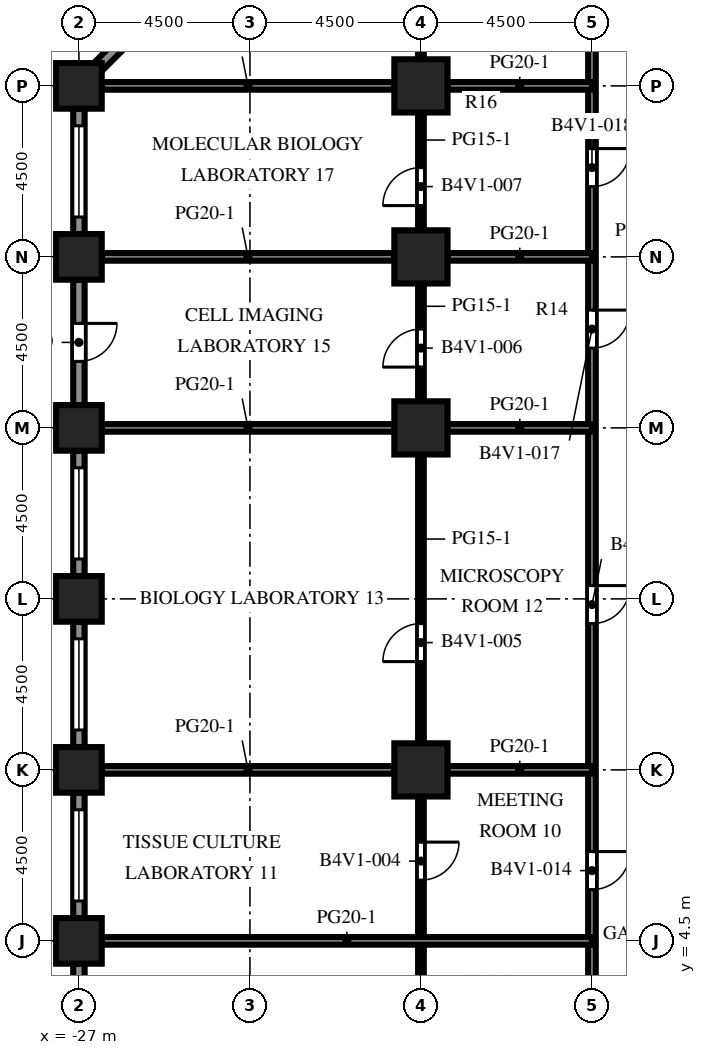
"""IFC4 building model, lengths in metres.
Left out: names, types, materials, properties, quantities, classifications, styles, units other than length and angle.
Written with IfcOpenShell. Run it as: python <this file> out.ifc"""

import sys

from ifc_helpers import new_model, si_unit, direction, frame, frame_2d, origin, origin_2d, place, context, subcontext, project, spatial, rectangle, extrude, element, fill, save


model = new_model("IFC4")
c1 = context("Model", 3, precision=1e-05, world=origin(), true_north=direction((0.0, 1.0)))
c2 = subcontext(c1, "Body", "Model", "MODEL_VIEW")
j1 = project(units=[si_unit("LENGTHUNIT", "METRE"), si_unit("PLANEANGLEUNIT", "RADIAN")], contexts=[c1])
p1 = place(None, origin())
s1 = spatial("IfcSite", under=j1, at=p1, CompositionType="ELEMENT")
p2 = place(p1, origin())
s2 = spatial("IfcBuilding", under=s1, at=p2, CompositionType="ELEMENT")
p3 = place(p2, frame((0.0, 0.0, 133.1)))
s3 = spatial("IfcBuildingStorey", under=s2, at=p3, CompositionType="ELEMENT", Elevation=133.1)
for number, where, z_axis, x_axis in (
    (1, (-27.0, 4.5, 0.0), (0.0, 0.0, 1.0), (1.0, 0.0, 0.0)),
    (2, (-27.0, 9.0, 0.0), (0.0, 0.0, 1.0), (1.0, 0.0, 0.0)),
    (3, (-27.0, 13.5, 0.0), (0.0, 0.0, 1.0), (1.0, 0.0, 0.0)),
    (4, (-27.0, 18.0, 0.0), (0.0, 0.0, 1.0), (1.0, 0.0, 0.0)),
    (5, (-27.0, 22.5, 0.0), (0.0, 0.0, 1.0), (1.0, 0.0, 0.0)),
    (6, (-27.0, 27.0, 0.0), (0.0, 0.0, 1.0), (1.0, 0.0, 0.0)),
):
    element("IfcColumn", number, at=place(p3, frame(where, z_axis=z_axis, x_axis=x_axis)), inside=s3, PredefinedType="COLUMN", context=c2, shape_type="SweptSolid", body=[
        extrude(rectangle(XDim=1.2, YDim=1.2, at=origin_2d()), origin(), (0.0, 0.0, 1.0), 4.1),
    ])
for number, where, z_axis, x_axis in (
    (7, (-18.0, 9.0, 0.0), (0.0, 0.0, 1.0), (1.0, 0.0, 0.0)),
    (8, (-18.0, 18.0, 0.0), (0.0, 0.0, 1.0), (1.0, 0.0, 0.0)),
    (9, (-18.0, 22.5, 0.0), (0.0, 0.0, 1.0), (1.0, 0.0, 0.0)),
    (10, (-18.0, 27.0, 0.0), (0.0, 0.0, 1.0), (1.0, 0.0, 0.0)),
):
    element("IfcColumn", number, at=place(p3, frame(where, z_axis=z_axis, x_axis=x_axis)), inside=s3, PredefinedType="COLUMN", context=c2, shape_type="SweptSolid", body=[
        extrude(rectangle(XDim=1.4, YDim=1.4, at=origin_2d()), origin(), (0.0, 0.0, 1.0), 4.1),
    ])
p4 = place(p3, frame((-26.506, 27.494, 0.0), z_axis=(0.0, 0.0, 1.0), x_axis=(0.707106781187, 0.707106781187, 0.0)))
e11 = element("IfcWall", 11, at=p4, inside=s3, PredefinedType="SOLIDWALL", context=c2, shape_type="SweptSolid", body=[
    extrude(rectangle(XDim=4.967, YDim=0.3, at=frame_2d((2.483, 0.0))), origin(), (0.0, 0.0, 1.0), 2.75),
])
p5 = place(p4, frame((1.884, 0.0, 0.0)))
e12 = element("IfcOpeningElement", 12, at=p5, cuts=e11, PredefinedType="OPENING", context=c2, shape_type="SweptSolid", body=[
    extrude(rectangle(XDim=1.2, YDim=2.2, at=frame_2d((0.6, 1.1))), frame((0.0, 0.16, 0.0), z_axis=(0.0, -1.0, 0.0), x_axis=(1.0, 0.0, 0.0)), (0.0, 0.0, 1.0), 0.32),
])
p6 = place(p3, frame((-27.0, 23.1, 0.0), z_axis=(0.0, 0.0, 1.0), x_axis=(0.0, 1.0, 0.0)))
e13 = element("IfcWall", 13, at=p6, inside=s3, PredefinedType="SOLIDWALL", context=c2, shape_type="SweptSolid", body=[
    extrude(rectangle(XDim=3.3, YDim=0.3, at=frame_2d((1.65, 0.0))), origin(), (0.0, 0.0, 1.0), 2.75),
])
p7 = place(p6, frame((0.45, 0.0, 0.8)))
e14 = element("IfcOpeningElement", 14, at=p7, cuts=e13, PredefinedType="OPENING", context=c2, shape_type="SweptSolid", body=[
    extrude(rectangle(XDim=2.4, YDim=1.7, at=frame_2d((1.2, 0.85))), frame((0.0, 0.16, 0.0), z_axis=(0.0, -1.0, 0.0), x_axis=(1.0, 0.0, 0.0)), (0.0, 0.0, 1.0), 0.32),
])
p8 = place(p3, frame((-27.0, 18.6, 0.0), z_axis=(0.0, 0.0, 1.0), x_axis=(0.0, 1.0, 0.0)))
e15 = element("IfcWall", 15, at=p8, inside=s3, PredefinedType="SOLIDWALL", context=c2, shape_type="SweptSolid", body=[
    extrude(rectangle(XDim=3.3, YDim=0.3, at=frame_2d((1.65, 0.0))), origin(), (0.0, 0.0, 1.0), 2.75),
])
p9 = place(p8, frame((1.15, 0.0, 0.0)))
e16 = element("IfcOpeningElement", 16, at=p9, cuts=e15, PredefinedType="OPENING", context=c2, shape_type="SweptSolid", body=[
    extrude(rectangle(XDim=1.0, YDim=2.2, at=frame_2d((0.5, 1.1))), frame((0.0, 0.16, 0.0), z_axis=(0.0, -1.0, 0.0), x_axis=(1.0, 0.0, 0.0)), (0.0, 0.0, 1.0), 0.32),
])
p10 = place(p3, frame((-27.0, 14.1, 0.0), z_axis=(0.0, 0.0, 1.0), x_axis=(0.0, 1.0, 0.0)))
e17 = element("IfcWall", 17, at=p10, inside=s3, PredefinedType="SOLIDWALL", context=c2, shape_type="SweptSolid", body=[
    extrude(rectangle(XDim=3.3, YDim=0.3, at=frame_2d((1.65, 0.0))), origin(), (0.0, 0.0, 1.0), 2.75),
])
p11 = place(p10, frame((0.45, 0.0, 0.8)))
e18 = element("IfcOpeningElement", 18, at=p11, cuts=e17, PredefinedType="OPENING", context=c2, shape_type="SweptSolid", body=[
    extrude(rectangle(XDim=2.4, YDim=1.7, at=frame_2d((1.2, 0.85))), frame((0.0, 0.16, 0.0), z_axis=(0.0, -1.0, 0.0), x_axis=(1.0, 0.0, 0.0)), (0.0, 0.0, 1.0), 0.32),
])
p12 = place(p3, frame((-27.0, 9.6, 0.0), z_axis=(0.0, 0.0, 1.0), x_axis=(0.0, 1.0, 0.0)))
e19 = element("IfcWall", 19, at=p12, inside=s3, PredefinedType="SOLIDWALL", context=c2, shape_type="SweptSolid", body=[
    extrude(rectangle(XDim=3.3, YDim=0.3, at=frame_2d((1.65, 0.0))), origin(), (0.0, 0.0, 1.0), 2.75),
])
p13 = place(p12, frame((0.45, 0.0, 0.8)))
e20 = element("IfcOpeningElement", 20, at=p13, cuts=e19, PredefinedType="OPENING", context=c2, shape_type="SweptSolid", body=[
    extrude(rectangle(XDim=2.4, YDim=1.7, at=frame_2d((1.2, 0.85))), frame((0.0, 0.16, 0.0), z_axis=(0.0, -1.0, 0.0), x_axis=(1.0, 0.0, 0.0)), (0.0, 0.0, 1.0), 0.32),
])
p14 = place(p3, frame((-27.0, 5.1, 0.0), z_axis=(0.0, 0.0, 1.0), x_axis=(0.0, 1.0, 0.0)))
e21 = element("IfcWall", 21, at=p14, inside=s3, PredefinedType="SOLIDWALL", context=c2, shape_type="SweptSolid", body=[
    extrude(rectangle(XDim=3.3, YDim=0.3, at=frame_2d((1.65, 0.0))), origin(), (0.0, 0.0, 1.0), 2.75),
])
p15 = place(p14, frame((0.45, 0.0, 0.8)))
e22 = element("IfcOpeningElement", 22, at=p15, cuts=e21, PredefinedType="OPENING", context=c2, shape_type="SweptSolid", body=[
    extrude(rectangle(XDim=2.4, YDim=1.7, at=frame_2d((1.2, 0.85))), frame((0.0, 0.16, 0.0), z_axis=(0.0, -1.0, 0.0), x_axis=(1.0, 0.0, 0.0)), (0.0, 0.0, 1.0), 0.32),
])
p16 = place(p3, frame((-27.0, 0.6, 0.0), z_axis=(0.0, 0.0, 1.0), x_axis=(0.0, 1.0, 0.0)))
e23 = element("IfcWall", 23, at=p16, inside=s3, PredefinedType="SOLIDWALL", context=c2, shape_type="SweptSolid", body=[
    extrude(rectangle(XDim=3.3, YDim=0.3, at=frame_2d((1.65, 0.0))), origin(), (0.0, 0.0, 1.0), 2.75),
])
p17 = place(p16, frame((0.45, 0.0, 0.8)))
e24 = element("IfcOpeningElement", 24, at=p17, cuts=e23, PredefinedType="OPENING", context=c2, shape_type="SweptSolid", body=[
    extrude(rectangle(XDim=2.4, YDim=1.7, at=frame_2d((1.2, 0.85))), frame((0.0, 0.16, 0.0), z_axis=(0.0, -1.0, 0.0), x_axis=(1.0, 0.0, 0.0)), (0.0, 0.0, 1.0), 0.32),
])
p18 = place(p3, frame((-18.0, 0.7, 0.0), z_axis=(0.0, 0.0, 1.0), x_axis=(0.0, 1.0, 0.0)))
e25 = element("IfcWall", 25, at=p18, inside=s3, PredefinedType="PARTITIONING", context=c2, shape_type="SweptSolid", body=[
    extrude(rectangle(XDim=7.6, YDim=0.15, at=frame_2d((3.8, 0.0))), origin(), (0.0, 0.0, 1.0), 3.65),
])
p19 = place(p18, frame((5.4, 0.0, 0.0)))
e26 = element("IfcOpeningElement", 26, at=p19, cuts=e25, PredefinedType="OPENING", context=c2, shape_type="SweptSolid", body=[
    extrude(rectangle(XDim=1.0, YDim=2.1, at=frame_2d((0.5, 1.05))), frame((0.0, 0.085, 0.0), z_axis=(0.0, -1.0, 0.0), x_axis=(1.0, 0.0, 0.0)), (0.0, 0.0, 1.0), 0.17),
])
p20 = place(p3, frame((-18.0, 9.7, 0.0), z_axis=(0.0, 0.0, 1.0), x_axis=(0.0, 1.0, 0.0)))
e27 = element("IfcWall", 27, at=p20, inside=s3, PredefinedType="PARTITIONING", context=c2, shape_type="SweptSolid", body=[
    extrude(rectangle(XDim=7.6, YDim=0.15, at=frame_2d((3.8, 0.0))), origin(), (0.0, 0.0, 1.0), 3.65),
])
p21 = place(p20, frame((2.15, 0.0, 0.0)))
e28 = element("IfcOpeningElement", 28, at=p21, cuts=e27, PredefinedType="OPENING", context=c2, shape_type="SweptSolid", body=[
    extrude(rectangle(XDim=1.0, YDim=2.1, at=frame_2d((0.5, 1.05))), frame((0.0, 0.085, 0.0), z_axis=(0.0, -1.0, 0.0), x_axis=(1.0, 0.0, 0.0)), (0.0, 0.0, 1.0), 0.17),
])
p22 = place(p3, frame((-18.0, 18.7, 0.0), z_axis=(0.0, 0.0, 1.0), x_axis=(0.0, 1.0, 0.0)))
e29 = element("IfcWall", 29, at=p22, inside=s3, PredefinedType="PARTITIONING", context=c2, shape_type="SweptSolid", body=[
    extrude(rectangle(XDim=3.1, YDim=0.15, at=frame_2d((1.55, 0.0))), origin(), (0.0, 0.0, 1.0), 3.65),
])
p23 = place(p22, frame((0.9, 0.0, 0.0)))
e30 = element("IfcOpeningElement", 30, at=p23, cuts=e29, PredefinedType="OPENING", context=c2, shape_type="SweptSolid", body=[
    extrude(rectangle(XDim=1.0, YDim=2.1, at=frame_2d((0.5, 1.05))), frame((0.0, 0.085, 0.0), z_axis=(0.0, -1.0, 0.0), x_axis=(1.0, 0.0, 0.0)), (0.0, 0.0, 1.0), 0.17),
])
p24 = place(p3, frame((-18.0, 23.2, 0.0), z_axis=(0.0, 0.0, 1.0), x_axis=(0.0, 1.0, 0.0)))
e31 = element("IfcWall", 31, at=p24, inside=s3, PredefinedType="PARTITIONING", context=c2, shape_type="SweptSolid", body=[
    extrude(rectangle(XDim=3.1, YDim=0.15, at=frame_2d((1.55, 0.0))), origin(), (0.0, 0.0, 1.0), 3.65),
])
p25 = place(p24, frame((0.65, 0.0, 0.0)))
e32 = element("IfcOpeningElement", 32, at=p25, cuts=e31, PredefinedType="OPENING", context=c2, shape_type="SweptSolid", body=[
    extrude(rectangle(XDim=1.0, YDim=2.1, at=frame_2d((0.5, 1.05))), frame((0.0, 0.085, 0.0), z_axis=(0.0, -1.0, 0.0), x_axis=(1.0, 0.0, 0.0)), (0.0, 0.0, 1.0), 0.17),
])
p26 = place(p3, frame((-18.0, 27.7, 0.0), z_axis=(0.0, 0.0, 1.0), x_axis=(0.0, 1.0, 0.0)))
e33 = element("IfcWall", 33, at=p26, inside=s3, PredefinedType="PARTITIONING", context=c2, shape_type="SweptSolid", body=[
    extrude(rectangle(XDim=3.2, YDim=0.15, at=frame_2d((1.6, 0.0))), origin(), (0.0, 0.0, 1.0), 3.65),
])
p27 = place(p26, frame((0.4, 0.0, 0.0)))
e34 = element("IfcOpeningElement", 34, at=p27, cuts=e33, PredefinedType="OPENING", context=c2, shape_type="SweptSolid", body=[
    extrude(rectangle(XDim=1.0, YDim=2.1, at=frame_2d((0.5, 1.05))), frame((0.0, 0.085, 0.0), z_axis=(0.0, -1.0, 0.0), x_axis=(1.0, 0.0, 0.0)), (0.0, 0.0, 1.0), 0.17),
])
p28 = place(p3, frame((-13.5, -21.9, 0.0), z_axis=(0.0, 0.0, 1.0), x_axis=(0.0, 1.0, 0.0)))
e35 = element("IfcWall", 35, at=p28, inside=s3, PredefinedType="PARTITIONING", context=c2, shape_type="SweptSolid", body=[
    extrude(rectangle(XDim=52.8, YDim=0.2, at=frame_2d((26.4, 0.0))), origin(), (0.0, 0.0, 1.0), 3.65),
])
p29 = place(p28, frame((3.25, 0.0, 0.0)))
e36 = element("IfcOpeningElement", 36, at=p29, cuts=e35, PredefinedType="OPENING", context=c2, shape_type="SweptSolid", body=[
    extrude(rectangle(XDim=1.0, YDim=2.1, at=frame_2d((0.5, 1.05))), frame((0.0, 0.11, 0.0), z_axis=(0.0, -1.0, 0.0), x_axis=(1.0, 0.0, 0.0)), (0.0, 0.0, 1.0), 0.22),
])
p30 = place(p28, frame((10.0, 0.0, 0.0)))
e37 = element("IfcOpeningElement", 37, at=p30, cuts=e35, PredefinedType="OPENING", context=c2, shape_type="SweptSolid", body=[
    extrude(rectangle(XDim=1.0, YDim=2.1, at=frame_2d((0.5, 1.05))), frame((0.0, 0.11, 0.0), z_axis=(0.0, -1.0, 0.0), x_axis=(1.0, 0.0, 0.0)), (0.0, 0.0, 1.0), 0.22),
])
p31 = place(p28, frame((21.0, 0.0, 0.0)))
e38 = element("IfcOpeningElement", 38, at=p31, cuts=e35, PredefinedType="OPENING", context=c2, shape_type="SweptSolid", body=[
    extrude(rectangle(XDim=1.0, YDim=2.1, at=frame_2d((0.5, 1.05))), frame((0.0, 0.11, 0.0), z_axis=(0.0, -1.0, 0.0), x_axis=(1.0, 0.0, 0.0)), (0.0, 0.0, 1.0), 0.22),
])
p32 = place(p28, frame((27.75, 0.0, 0.0)))
e39 = element("IfcOpeningElement", 39, at=p32, cuts=e35, PredefinedType="OPENING", context=c2, shape_type="SweptSolid", body=[
    extrude(rectangle(XDim=1.0, YDim=2.1, at=frame_2d((0.5, 1.05))), frame((0.0, 0.11, 0.0), z_axis=(0.0, -1.0, 0.0), x_axis=(1.0, 0.0, 0.0)), (0.0, 0.0, 1.0), 0.22),
])
p33 = place(p28, frame((34.75, 0.0, 0.0)))
e40 = element("IfcOpeningElement", 40, at=p33, cuts=e35, PredefinedType="OPENING", context=c2, shape_type="SweptSolid", body=[
    extrude(rectangle(XDim=1.0, YDim=2.1, at=frame_2d((0.5, 1.05))), frame((0.0, 0.11, 0.0), z_axis=(0.0, -1.0, 0.0), x_axis=(1.0, 0.0, 0.0)), (0.0, 0.0, 1.0), 0.22),
])
p34 = place(p28, frame((42.0, 0.0, 0.0)))
e41 = element("IfcOpeningElement", 41, at=p34, cuts=e35, PredefinedType="OPENING", context=c2, shape_type="SweptSolid", body=[
    extrude(rectangle(XDim=1.0, YDim=2.1, at=frame_2d((0.5, 1.05))), frame((0.0, 0.11, 0.0), z_axis=(0.0, -1.0, 0.0), x_axis=(1.0, 0.0, 0.0)), (0.0, 0.0, 1.0), 0.22),
])
p35 = place(p28, frame((46.25, 0.0, 0.0)))
e42 = element("IfcOpeningElement", 42, at=p35, cuts=e35, PredefinedType="OPENING", context=c2, shape_type="SweptSolid", body=[
    extrude(rectangle(XDim=1.0, YDim=2.1, at=frame_2d((0.5, 1.05))), frame((0.0, 0.11, 0.0), z_axis=(0.0, -1.0, 0.0), x_axis=(1.0, 0.0, 0.0)), (0.0, 0.0, 1.0), 0.22),
])
p36 = place(p28, frame((51.0, 0.0, 0.0)))
e43 = element("IfcOpeningElement", 43, at=p36, cuts=e35, PredefinedType="OPENING", context=c2, shape_type="SweptSolid", body=[
    extrude(rectangle(XDim=1.0, YDim=2.1, at=frame_2d((0.5, 1.05))), frame((0.0, 0.11, 0.0), z_axis=(0.0, -1.0, 0.0), x_axis=(1.0, 0.0, 0.0)), (0.0, 0.0, 1.0), 0.22),
])
p37 = place(p3, frame((-26.4, 4.5, 0.0), z_axis=(0.0, 0.0, 1.0), x_axis=(1.0, 0.0, 0.0)))
e44 = element("IfcWall", 44, at=p37, inside=s3, PredefinedType="PARTITIONING", context=c2, shape_type="SweptSolid", body=[
    extrude(rectangle(XDim=12.9, YDim=0.2, at=frame_2d((6.45, 0.0))), origin(), (0.0, 0.0, 1.0), 3.65),
])
p38 = place(p3, frame((-26.4, 9.0, 0.0), z_axis=(0.0, 0.0, 1.0), x_axis=(1.0, 0.0, 0.0)))
e45 = element("IfcWall", 45, at=p38, inside=s3, PredefinedType="PARTITIONING", context=c2, shape_type="SweptSolid", body=[
    extrude(rectangle(XDim=7.7, YDim=0.2, at=frame_2d((3.85, 0.0))), origin(), (0.0, 0.0, 1.0), 3.65),
])
p39 = place(p3, frame((-17.3, 9.0, 0.0), z_axis=(0.0, 0.0, 1.0), x_axis=(1.0, 0.0, 0.0)))
e46 = element("IfcWall", 46, at=p39, inside=s3, PredefinedType="PARTITIONING", context=c2, shape_type="SweptSolid", body=[
    extrude(rectangle(XDim=3.8, YDim=0.2, at=frame_2d((1.9, 0.0))), origin(), (0.0, 0.0, 1.0), 3.65),
])
p40 = place(p3, frame((-26.4, 18.0, 0.0), z_axis=(0.0, 0.0, 1.0), x_axis=(1.0, 0.0, 0.0)))
e47 = element("IfcWall", 47, at=p40, inside=s3, PredefinedType="PARTITIONING", context=c2, shape_type="SweptSolid", body=[
    extrude(rectangle(XDim=7.7, YDim=0.2, at=frame_2d((3.85, 0.0))), origin(), (0.0, 0.0, 1.0), 3.65),
])
p41 = place(p3, frame((-17.3, 18.0, 0.0), z_axis=(0.0, 0.0, 1.0), x_axis=(1.0, 0.0, 0.0)))
e48 = element("IfcWall", 48, at=p41, inside=s3, PredefinedType="PARTITIONING", context=c2, shape_type="SweptSolid", body=[
    extrude(rectangle(XDim=3.8, YDim=0.2, at=frame_2d((1.9, 0.0))), origin(), (0.0, 0.0, 1.0), 3.65),
])
p42 = place(p3, frame((-26.4, 22.5, 0.0), z_axis=(0.0, 0.0, 1.0), x_axis=(1.0, 0.0, 0.0)))
e49 = element("IfcWall", 49, at=p42, inside=s3, PredefinedType="PARTITIONING", context=c2, shape_type="SweptSolid", body=[
    extrude(rectangle(XDim=7.7, YDim=0.2, at=frame_2d((3.85, 0.0))), origin(), (0.0, 0.0, 1.0), 3.65),
])
p43 = place(p3, frame((-17.3, 22.5, 0.0), z_axis=(0.0, 0.0, 1.0), x_axis=(1.0, 0.0, 0.0)))
e50 = element("IfcWall", 50, at=p43, inside=s3, PredefinedType="PARTITIONING", context=c2, shape_type="SweptSolid", body=[
    extrude(rectangle(XDim=3.8, YDim=0.2, at=frame_2d((1.9, 0.0))), origin(), (0.0, 0.0, 1.0), 3.65),
])
p44 = place(p3, frame((-26.4, 27.0, 0.0), z_axis=(0.0, 0.0, 1.0), x_axis=(1.0, 0.0, 0.0)))
e51 = element("IfcWall", 51, at=p44, inside=s3, PredefinedType="PARTITIONING", context=c2, shape_type="SweptSolid", body=[
    extrude(rectangle(XDim=7.7, YDim=0.2, at=frame_2d((3.85, 0.0))), origin(), (0.0, 0.0, 1.0), 3.65),
])
p45 = place(p3, frame((-17.3, 27.0, 0.0), z_axis=(0.0, 0.0, 1.0), x_axis=(1.0, 0.0, 0.0)))
e52 = element("IfcWall", 52, at=p45, inside=s3, PredefinedType="PARTITIONING", context=c2, shape_type="SweptSolid", body=[
    extrude(rectangle(XDim=3.8, YDim=0.2, at=frame_2d((1.9, 0.0))), origin(), (0.0, 0.0, 1.0), 3.65),
])
p46 = place(p7, origin())
e53 = element("IfcWindow", 53, at=p46, inside=s3, PartitioningType="SINGLE_PANEL", PredefinedType="WINDOW", context=c2, shape_type="SweptSolid", body=[
    extrude(rectangle(XDim=2.4, YDim=1.7, at=frame_2d((1.2, 0.85))), frame((0.0, 0.03, 0.0), z_axis=(0.0, -1.0, 0.0), x_axis=(1.0, 0.0, 0.0)), (0.0, 0.0, 1.0), 0.06),
])
fill(e14, e53)
p47 = place(p9, origin())
e54 = element("IfcDoor", 54, at=p47, inside=s3, OperationType="SINGLE_SWING_RIGHT", PredefinedType="DOOR", context=c2, shape_type="SweptSolid", body=[
    extrude(rectangle(XDim=1.0, YDim=2.2, at=frame_2d((0.5, 1.1))), frame((0.0, 0.025, 0.0), z_axis=(0.0, -1.0, 0.0), x_axis=(1.0, 0.0, 0.0)), (0.0, 0.0, 1.0), 0.05),
])
fill(e16, e54)
p48 = place(p11, origin())
e55 = element("IfcWindow", 55, at=p48, inside=s3, PartitioningType="SINGLE_PANEL", PredefinedType="WINDOW", context=c2, shape_type="SweptSolid", body=[
    extrude(rectangle(XDim=2.4, YDim=1.7, at=frame_2d((1.2, 0.85))), frame((0.0, 0.03, 0.0), z_axis=(0.0, -1.0, 0.0), x_axis=(1.0, 0.0, 0.0)), (0.0, 0.0, 1.0), 0.06),
])
fill(e18, e55)
p49 = place(p13, origin())
e56 = element("IfcWindow", 56, at=p49, inside=s3, PartitioningType="SINGLE_PANEL", PredefinedType="WINDOW", context=c2, shape_type="SweptSolid", body=[
    extrude(rectangle(XDim=2.4, YDim=1.7, at=frame_2d((1.2, 0.85))), frame((0.0, 0.03, 0.0), z_axis=(0.0, -1.0, 0.0), x_axis=(1.0, 0.0, 0.0)), (0.0, 0.0, 1.0), 0.06),
])
fill(e20, e56)
p50 = place(p15, origin())
e57 = element("IfcWindow", 57, at=p50, inside=s3, PartitioningType="SINGLE_PANEL", PredefinedType="WINDOW", context=c2, shape_type="SweptSolid", body=[
    extrude(rectangle(XDim=2.4, YDim=1.7, at=frame_2d((1.2, 0.85))), frame((0.0, 0.03, 0.0), z_axis=(0.0, -1.0, 0.0), x_axis=(1.0, 0.0, 0.0)), (0.0, 0.0, 1.0), 0.06),
])
fill(e22, e57)
p51 = place(p19, origin())
e58 = element("IfcDoor", 58, at=p51, inside=s3, OperationType="SINGLE_SWING_RIGHT", PredefinedType="DOOR", context=c2, shape_type="SweptSolid", body=[
    extrude(rectangle(XDim=1.0, YDim=2.1, at=frame_2d((0.5, 1.05))), frame((0.0, 0.025, 0.0), z_axis=(0.0, -1.0, 0.0), x_axis=(1.0, 0.0, 0.0)), (0.0, 0.0, 1.0), 0.05),
])
fill(e26, e58)
p52 = place(p21, origin())
e59 = element("IfcDoor", 59, at=p52, inside=s3, OperationType="SINGLE_SWING_LEFT", PredefinedType="DOOR", context=c2, shape_type="SweptSolid", body=[
    extrude(rectangle(XDim=1.0, YDim=2.1, at=frame_2d((0.5, 1.05))), frame((0.0, 0.025, 0.0), z_axis=(0.0, -1.0, 0.0), x_axis=(1.0, 0.0, 0.0)), (0.0, 0.0, 1.0), 0.05),
])
fill(e28, e59)
p53 = place(p23, origin())
e60 = element("IfcDoor", 60, at=p53, inside=s3, OperationType="SINGLE_SWING_LEFT", PredefinedType="DOOR", context=c2, shape_type="SweptSolid", body=[
    extrude(rectangle(XDim=1.0, YDim=2.1, at=frame_2d((0.5, 1.05))), frame((0.0, 0.025, 0.0), z_axis=(0.0, -1.0, 0.0), x_axis=(1.0, 0.0, 0.0)), (0.0, 0.0, 1.0), 0.05),
])
fill(e30, e60)
p54 = place(p25, origin())
e61 = element("IfcDoor", 61, at=p54, inside=s3, OperationType="SINGLE_SWING_LEFT", PredefinedType="DOOR", context=c2, shape_type="SweptSolid", body=[
    extrude(rectangle(XDim=1.0, YDim=2.1, at=frame_2d((0.5, 1.05))), frame((0.0, 0.025, 0.0), z_axis=(0.0, -1.0, 0.0), x_axis=(1.0, 0.0, 0.0)), (0.0, 0.0, 1.0), 0.05),
])
fill(e32, e61)
p55 = place(p32, origin())
e62 = element("IfcDoor", 62, at=p55, inside=s3, OperationType="SINGLE_SWING_RIGHT", PredefinedType="DOOR", context=c2, shape_type="SweptSolid", body=[
    extrude(rectangle(XDim=1.0, YDim=2.1, at=frame_2d((0.5, 1.05))), frame((0.0, 0.025, 0.0), z_axis=(0.0, -1.0, 0.0), x_axis=(1.0, 0.0, 0.0)), (0.0, 0.0, 1.0), 0.05),
])
fill(e39, e62)
p56 = place(p33, origin())
e63 = element("IfcDoor", 63, at=p56, inside=s3, OperationType="SINGLE_SWING_RIGHT", PredefinedType="DOOR", context=c2, shape_type="SweptSolid", body=[
    extrude(rectangle(XDim=1.0, YDim=2.1, at=frame_2d((0.5, 1.05))), frame((0.0, 0.025, 0.0), z_axis=(0.0, -1.0, 0.0), x_axis=(1.0, 0.0, 0.0)), (0.0, 0.0, 1.0), 0.05),
])
fill(e40, e63)
p57 = place(p34, origin())
e64 = element("IfcDoor", 64, at=p57, inside=s3, OperationType="SINGLE_SWING_RIGHT", PredefinedType="DOOR", context=c2, shape_type="SweptSolid", body=[
    extrude(rectangle(XDim=1.0, YDim=2.1, at=frame_2d((0.5, 1.05))), frame((0.0, 0.025, 0.0), z_axis=(0.0, -1.0, 0.0), x_axis=(1.0, 0.0, 0.0)), (0.0, 0.0, 1.0), 0.05),
])
fill(e41, e64)
p58 = place(p35, origin())
e65 = element("IfcDoor", 65, at=p58, inside=s3, OperationType="SINGLE_SWING_RIGHT", PredefinedType="DOOR", context=c2, shape_type="SweptSolid", body=[
    extrude(rectangle(XDim=1.0, YDim=2.1, at=frame_2d((0.5, 1.05))), frame((0.0, 0.025, 0.0), z_axis=(0.0, -1.0, 0.0), x_axis=(1.0, 0.0, 0.0)), (0.0, 0.0, 1.0), 0.05),
])
fill(e42, e65)
save(model, sys.argv[1])
